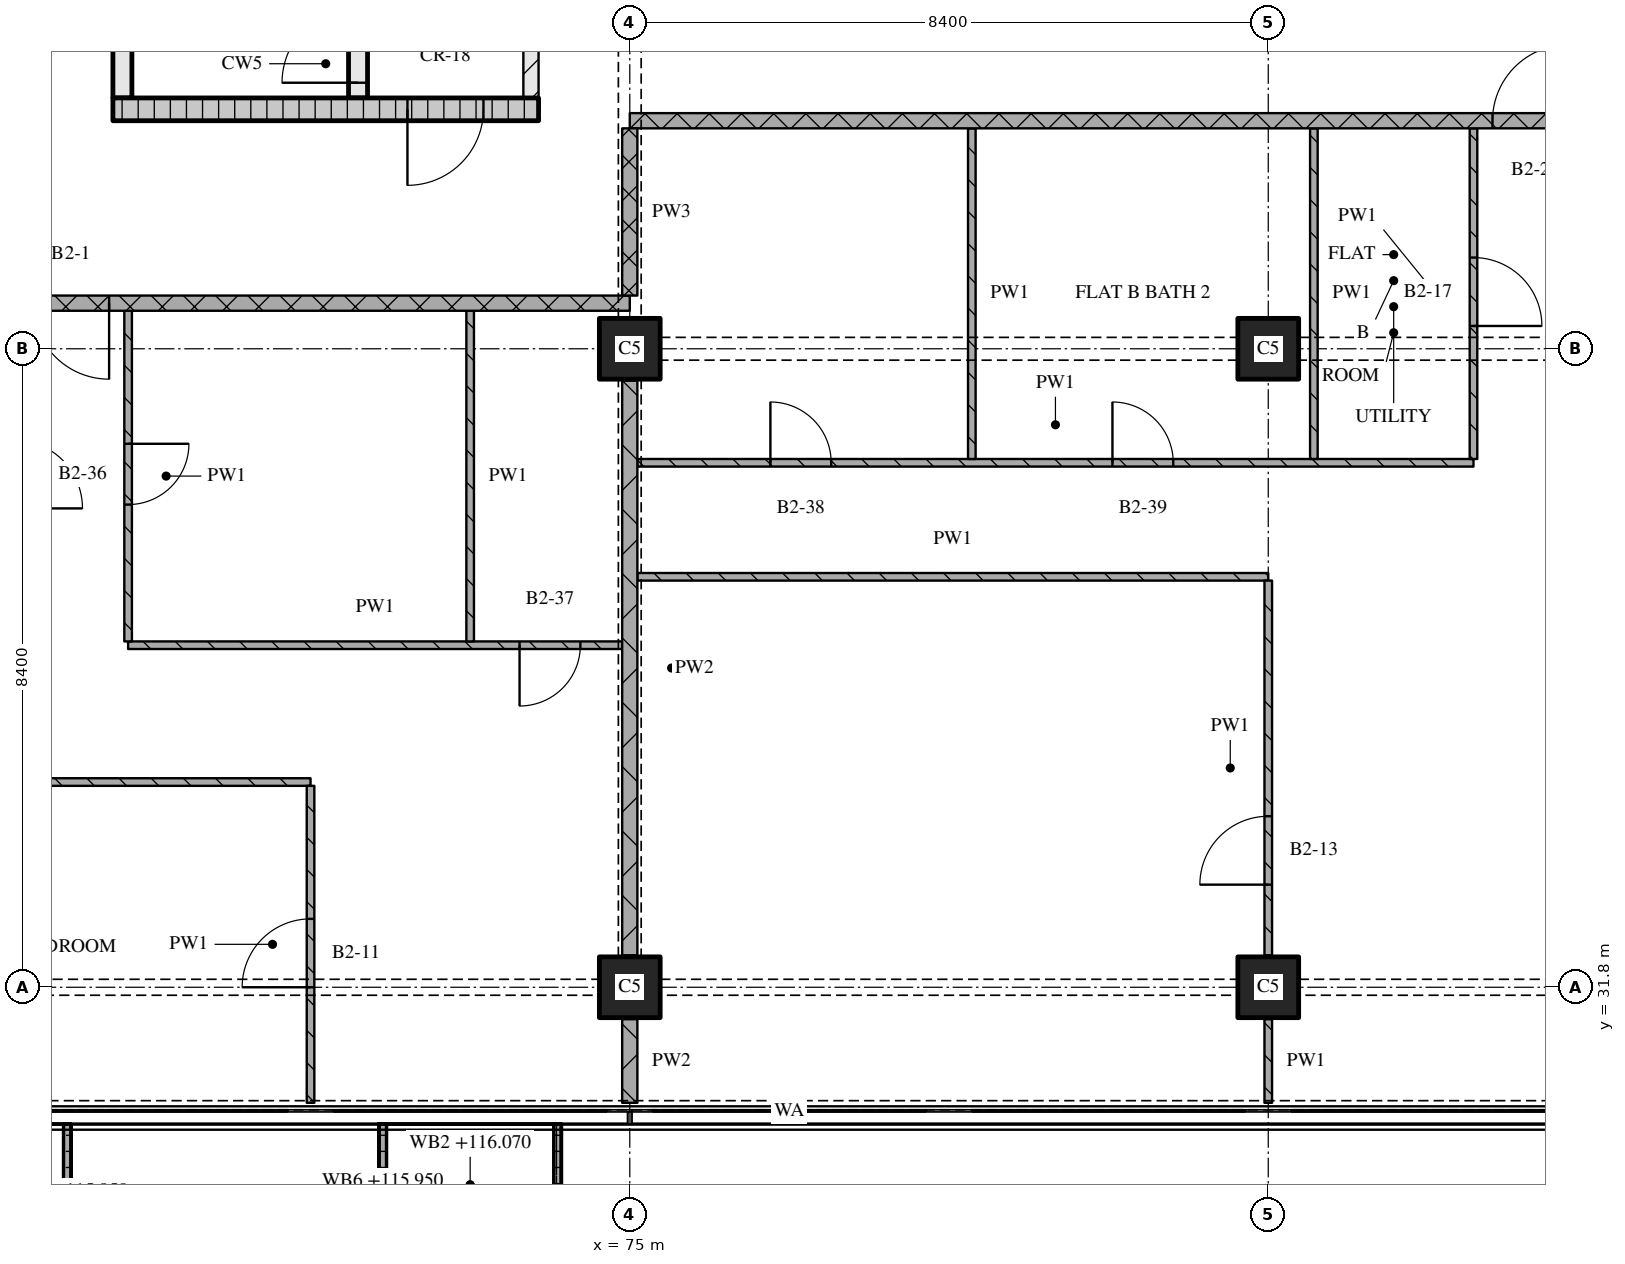
"""IFC4 building model, lengths in metres.
Left out: names, types, materials, properties, quantities, classifications, styles, units other than length and angle.
Written with IfcOpenShell. Run it as: python <this file> out.ifc"""

import sys

from ifc_helpers import new_model, si_unit, direction, frame, frame_2d, origin, origin_2d, place, context, subcontext, project, spatial, polyline, rectangle, outline, extrude, element, fill, save


model = new_model("IFC4")
c1 = context("Model", 3, precision=1e-05, world=origin(), true_north=direction((0.0, 1.0)))
c2 = subcontext(c1, "Body", "Model", "MODEL_VIEW")
j1 = project(units=[si_unit("LENGTHUNIT", "METRE"), si_unit("PLANEANGLEUNIT", "RADIAN")], contexts=[c1])
p1 = place(None, origin())
s1 = spatial("IfcSite", under=j1, at=p1, CompositionType="ELEMENT")
p2 = place(p1, origin())
s2 = spatial("IfcBuilding", under=s1, at=p2, CompositionType="ELEMENT")
p3 = place(p2, frame((0.0, 0.0, 113.25)))
s3 = spatial("IfcBuildingStorey", under=s2, at=p3, CompositionType="ELEMENT", Elevation=113.25)
for number, where, z_axis, x_axis in (
    (1, (75.0, 31.8, 0.0), (0.0, 0.0, 1.0), (1.0, 0.0, 0.0)),
    (2, (75.0, 40.2, 0.0), (0.0, 0.0, 1.0), (1.0, 0.0, 0.0)),
    (3, (83.4, 31.8, 0.0), (0.0, 0.0, 1.0), (1.0, 0.0, 0.0)),
    (4, (83.4, 40.2, 0.0), (0.0, 0.0, 1.0), (1.0, 0.0, 0.0)),
):
    element("IfcColumn", number, at=place(p3, frame(where, z_axis=z_axis, x_axis=x_axis)), inside=s3, PredefinedType="COLUMN", context=c2, shape_type="SweptSolid", body=[
        extrude(rectangle(XDim=0.8, YDim=0.8, at=origin_2d()), origin(), (0.0, 0.0, 1.0), 3.6),
    ])
p4 = place(p3, origin())
e5 = element("IfcWall", 5, at=p4, inside=s3, PredefinedType="SOLIDWALL", context=c2, shape_type="SweptSolid", body=[
    extrude(outline(polyline([(61.35, 30.0), (61.45, 30.0), (61.45, 28.233), (67.55, 28.233), (67.55, 30.0), (67.65, 30.0), (67.65, 28.133), (61.35, 28.133), (61.35, 30.0)])), origin(), (0.0, 0.0, 1.0), 1.0),
])
p5 = place(p3, origin())
e6 = element("IfcWall", 6, at=p5, inside=s3, PredefinedType="SOLIDWALL", context=c2, shape_type="SweptSolid", body=[
    extrude(outline(polyline([(71.7, 30.0), (71.8, 30.0), (71.8, 28.5), (74.0, 28.5), (74.0, 30.0), (74.1, 30.0), (74.1, 28.4), (71.7, 28.4), (71.7, 30.0)])), origin(), (0.0, 0.0, 1.0), 1.0),
])
p6 = place(p3, frame((68.2, 43.35, 0.0), z_axis=(0.0, 0.0, 1.0), x_axis=(1.0, 0.0, 0.0)))
e7 = element("IfcWall", 7, at=p6, inside=s3, PredefinedType="SOLIDWALL", context=c2, shape_type="SweptSolid", body=[
    extrude(rectangle(XDim=5.6, YDim=0.3, at=frame_2d((2.8, 0.0))), origin(), (0.0, 0.0, 1.0), 3.32),
])
p7 = place(p6, frame((3.875, 0.0, 0.0)))
e8 = element("IfcOpeningElement", 8, at=p7, cuts=e7, PredefinedType="OPENING", context=c2, shape_type="SweptSolid", body=[
    extrude(rectangle(XDim=1.0, YDim=2.1, at=frame_2d((0.5, 1.05))), frame((0.0, 0.16, 0.0), z_axis=(0.0, -1.0, 0.0), x_axis=(1.0, 0.0, 0.0)), (0.0, 0.0, 1.0), 0.32),
])
p8 = place(p3, frame((68.325, 43.5, 0.0), z_axis=(0.0, 0.0, 1.0), x_axis=(0.0, 1.0, 0.0)))
e9 = element("IfcWall", 9, at=p8, inside=s3, PredefinedType="SOLIDWALL", context=c2, shape_type="SweptSolid", body=[
    extrude(rectangle(XDim=6.9, YDim=0.25, at=frame_2d((3.45, 0.0))), origin(), (0.0, 0.0, 1.0), 3.32),
])
p9 = place(p3, frame((71.425, 43.5, 0.0), z_axis=(0.0, 0.0, 1.0), x_axis=(0.0, 1.0, 0.0)))
e10 = element("IfcWall", 10, at=p9, inside=s3, PredefinedType="SOLIDWALL", context=c2, shape_type="SweptSolid", body=[
    extrude(rectangle(XDim=6.9, YDim=0.25, at=frame_2d((3.45, 0.0))), origin(), (0.0, 0.0, 1.0), 3.32),
])
p10 = place(p9, frame((0.2, 0.0, 0.0)))
e11 = element("IfcOpeningElement", 11, at=p10, cuts=e10, PredefinedType="OPENING", context=c2, shape_type="SweptSolid", body=[
    extrude(rectangle(XDim=1.0, YDim=2.1, at=frame_2d((0.5, 1.05))), frame((0.0, 0.135, 0.0), z_axis=(0.0, -1.0, 0.0), x_axis=(1.0, 0.0, 0.0)), (0.0, 0.0, 1.0), 0.27),
])
p11 = place(p3, frame((73.7, 43.5, 0.0), z_axis=(0.0, 0.0, 1.0), x_axis=(0.0, 1.0, 0.0)))
e12 = element("IfcWall", 12, at=p11, inside=s3, PredefinedType="PARTITIONING", context=c2, shape_type="SweptSolid", body=[
    extrude(rectangle(XDim=6.9, YDim=0.2, at=frame_2d((3.45, 0.0))), origin(), (0.0, 0.0, 1.0), 3.32),
])
p12 = place(p11, frame((1.0, 0.0, 0.0)))
e13 = element("IfcOpeningElement", 13, at=p12, cuts=e12, PredefinedType="OPENING", context=c2, shape_type="SweptSolid", body=[
    extrude(rectangle(XDim=1.0, YDim=2.1, at=frame_2d((0.5, 1.05))), frame((0.0, 0.11, 0.0), z_axis=(0.0, -1.0, 0.0), x_axis=(1.0, 0.0, 0.0)), (0.0, 0.0, 1.0), 0.22),
])
p13 = place(p3, frame((70.8, 34.5, 0.0), z_axis=(0.0, 0.0, 1.0), x_axis=(-1.0, 0.0, 0.0)))
e14 = element("IfcWall", 14, at=p13, inside=s3, PredefinedType="PARTITIONING", context=c2, shape_type="SweptSolid", body=[
    extrude(rectangle(XDim=22.52, YDim=0.1, at=frame_2d((11.26, 0.0))), origin(), (0.0, 0.0, 1.0), 3.32),
])
p14 = place(p13, frame((10.05, 0.0, 0.0)))
e15 = element("IfcOpeningElement", 15, at=p14, cuts=e14, PredefinedType="OPENING", context=c2, shape_type="SweptSolid", body=[
    extrude(rectangle(XDim=0.9, YDim=2.1, at=frame_2d((0.45, 1.05))), frame((0.0, 0.06, 0.0), z_axis=(0.0, -1.0, 0.0), x_axis=(1.0, 0.0, 0.0)), (0.0, 0.0, 1.0), 0.12),
])
p15 = place(p13, frame((14.25, 0.0, 0.0)))
e16 = element("IfcOpeningElement", 16, at=p15, cuts=e14, PredefinedType="OPENING", context=c2, shape_type="SweptSolid", body=[
    extrude(rectangle(XDim=0.9, YDim=2.1, at=frame_2d((0.45, 1.05))), frame((0.0, 0.06, 0.0), z_axis=(0.0, -1.0, 0.0), x_axis=(1.0, 0.0, 0.0)), (0.0, 0.0, 1.0), 0.12),
])
p16 = place(p13, frame((17.654, 0.0, 0.0)))
e17 = element("IfcOpeningElement", 17, at=p16, cuts=e14, PredefinedType="OPENING", context=c2, shape_type="SweptSolid", body=[
    extrude(rectangle(XDim=0.9, YDim=2.1, at=frame_2d((0.45, 1.05))), frame((0.0, 0.06, 0.0), z_axis=(0.0, -1.0, 0.0), x_axis=(1.0, 0.0, 0.0)), (0.0, 0.0, 1.0), 0.12),
])
p17 = place(p3, frame((68.4, 36.3, 0.0), z_axis=(0.0, 0.0, 1.0), x_axis=(1.0, 0.0, 0.0)))
e18 = element("IfcWall", 18, at=p17, inside=s3, PredefinedType="PARTITIONING", context=c2, shape_type="SweptSolid", body=[
    extrude(rectangle(XDim=6.5, YDim=0.1, at=frame_2d((3.25, 0.0))), origin(), (0.0, 0.0, 1.0), 3.32),
])
p18 = place(p17, frame((5.15, 0.0, 0.0)))
e19 = element("IfcOpeningElement", 19, at=p18, cuts=e18, PredefinedType="OPENING", context=c2, shape_type="SweptSolid", body=[
    extrude(rectangle(XDim=0.8, YDim=2.1, at=frame_2d((0.4, 1.05))), frame((0.0, 0.06, 0.0), z_axis=(0.0, -1.0, 0.0), x_axis=(1.0, 0.0, 0.0)), (0.0, 0.0, 1.0), 0.12),
])
p19 = place(p3, frame((75.1, 37.2, 0.0), z_axis=(0.0, 0.0, 1.0), x_axis=(1.0, 0.0, 0.0)))
e20 = element("IfcWall", 20, at=p19, inside=s3, PredefinedType="PARTITIONING", context=c2, shape_type="SweptSolid", body=[
    extrude(rectangle(XDim=8.3, YDim=0.1, at=frame_2d((4.15, 0.0))), origin(), (0.0, 0.0, 1.0), 3.32),
])
p20 = place(p3, frame((75.1, 38.7, 0.0), z_axis=(0.0, 0.0, 1.0), x_axis=(1.0, 0.0, 0.0)))
e21 = element("IfcWall", 21, at=p20, inside=s3, PredefinedType="PARTITIONING", context=c2, shape_type="SweptSolid", body=[
    extrude(rectangle(XDim=11.0, YDim=0.1, at=frame_2d((5.5, 0.0))), origin(), (0.0, 0.0, 1.0), 3.32),
])
p21 = place(p20, frame((1.75, 0.0, 0.0)))
e22 = element("IfcOpeningElement", 22, at=p21, cuts=e21, PredefinedType="OPENING", context=c2, shape_type="SweptSolid", body=[
    extrude(rectangle(XDim=0.8, YDim=2.1, at=frame_2d((0.4, 1.05))), frame((0.0, 0.06, 0.0), z_axis=(0.0, -1.0, 0.0), x_axis=(1.0, 0.0, 0.0)), (0.0, 0.0, 1.0), 0.12),
])
p22 = place(p20, frame((6.25, 0.0, 0.0)))
e23 = element("IfcOpeningElement", 23, at=p22, cuts=e21, PredefinedType="OPENING", context=c2, shape_type="SweptSolid", body=[
    extrude(rectangle(XDim=0.8, YDim=2.1, at=frame_2d((0.4, 1.05))), frame((0.0, 0.06, 0.0), z_axis=(0.0, -1.0, 0.0), x_axis=(1.0, 0.0, 0.0)), (0.0, 0.0, 1.0), 0.12),
])
p23 = place(p3, frame((75.0, 40.8, 0.0), z_axis=(0.0, 0.0, 1.0), x_axis=(-1.0, 0.0, 0.0)))
e24 = element("IfcWall", 24, at=p23, inside=s3, PredefinedType="PARTITIONING", context=c2, shape_type="SweptSolid", body=[
    extrude(rectangle(XDim=24.18, YDim=0.2, at=frame_2d((12.09, 0.0))), origin(), (0.0, 0.0, 1.0), 3.32),
])
p24 = place(p23, frame((6.85, 0.0, 0.0)))
e25 = element("IfcOpeningElement", 25, at=p24, cuts=e24, PredefinedType="OPENING", context=c2, shape_type="SweptSolid", body=[
    extrude(rectangle(XDim=1.0, YDim=2.1, at=frame_2d((0.5, 1.05))), frame((0.0, 0.11, 0.0), z_axis=(0.0, -1.0, 0.0), x_axis=(1.0, 0.0, 0.0)), (0.0, 0.0, 1.0), 0.22),
])
p25 = place(p3, frame((100.2, 43.2, 0.0), z_axis=(0.0, 0.0, 1.0), x_axis=(-1.0, 0.0, 0.0)))
e26 = element("IfcWall", 26, at=p25, inside=s3, PredefinedType="PARTITIONING", context=c2, shape_type="SweptSolid", body=[
    extrude(rectangle(XDim=25.2, YDim=0.2, at=frame_2d((12.6, 0.0))), origin(), (0.0, 0.0, 1.0), 3.32),
])
p26 = place(p25, frame((12.85, 0.0, 0.0)))
e27 = element("IfcOpeningElement", 27, at=p26, cuts=e26, PredefinedType="OPENING", context=c2, shape_type="SweptSolid", body=[
    extrude(rectangle(XDim=1.0, YDim=2.1, at=frame_2d((0.5, 1.05))), frame((0.0, 0.11, 0.0), z_axis=(0.0, -1.0, 0.0), x_axis=(1.0, 0.0, 0.0)), (0.0, 0.0, 1.0), 0.22),
])
p27 = place(p3, frame((68.4, 40.7, 0.0), z_axis=(0.0, 0.0, 1.0), x_axis=(0.0, -1.0, 0.0)))
e28 = element("IfcWall", 28, at=p27, inside=s3, PredefinedType="PARTITIONING", context=c2, shape_type="SweptSolid", body=[
    extrude(rectangle(XDim=4.35, YDim=0.1, at=frame_2d((2.175, 0.0))), origin(), (0.0, 0.0, 1.0), 3.32),
])
p28 = place(p27, frame((1.75, 0.0, 0.0)))
e29 = element("IfcOpeningElement", 29, at=p28, cuts=e28, PredefinedType="OPENING", context=c2, shape_type="SweptSolid", body=[
    extrude(rectangle(XDim=0.8, YDim=2.1, at=frame_2d((0.4, 1.05))), frame((0.0, 0.06, 0.0), z_axis=(0.0, -1.0, 0.0), x_axis=(1.0, 0.0, 0.0)), (0.0, 0.0, 1.0), 0.12),
])
p29 = place(p3, frame((70.8, 30.28, 0.0), z_axis=(0.0, 0.0, 1.0), x_axis=(0.0, 1.0, 0.0)))
e30 = element("IfcWall", 30, at=p29, inside=s3, PredefinedType="PARTITIONING", context=c2, shape_type="SweptSolid", body=[
    extrude(rectangle(XDim=4.17, YDim=0.1, at=frame_2d((2.085, 0.0))), origin(), (0.0, 0.0, 1.0), 3.32),
])
p30 = place(p29, frame((1.52, 0.0, 0.0)))
e31 = element("IfcOpeningElement", 31, at=p30, cuts=e30, PredefinedType="OPENING", context=c2, shape_type="SweptSolid", body=[
    extrude(rectangle(XDim=0.9, YDim=2.1, at=frame_2d((0.45, 1.05))), frame((0.0, 0.06, 0.0), z_axis=(0.0, -1.0, 0.0), x_axis=(1.0, 0.0, 0.0)), (0.0, 0.0, 1.0), 0.12),
])
p31 = place(p3, frame((72.9, 40.7, 0.0), z_axis=(0.0, 0.0, 1.0), x_axis=(0.0, -1.0, 0.0)))
e32 = element("IfcWall", 32, at=p31, inside=s3, PredefinedType="PARTITIONING", context=c2, shape_type="SweptSolid", body=[
    extrude(rectangle(XDim=4.35, YDim=0.1, at=frame_2d((2.175, 0.0))), origin(), (0.0, 0.0, 1.0), 3.32),
])
p32 = place(p3, frame((75.0, 43.1, 0.0), z_axis=(0.0, 0.0, 1.0), x_axis=(0.0, -1.0, 0.0)))
e33 = element("IfcWall", 33, at=p32, inside=s3, PredefinedType="PARTITIONING", context=c2, shape_type="SweptSolid", body=[
    extrude(rectangle(XDim=2.2, YDim=0.2, at=frame_2d((1.1, 0.0))), origin(), (0.0, 0.0, 1.0), 2.43),
])
p33 = place(p3, frame((75.0, 31.38, 0.0), z_axis=(0.0, 0.0, 1.0), x_axis=(0.0, -1.0, 0.0)))
e34 = element("IfcWall", 34, at=p33, inside=s3, PredefinedType="PARTITIONING", context=c2, shape_type="SweptSolid", body=[
    extrude(rectangle(XDim=1.1, YDim=0.2, at=frame_2d((0.55, 0.0))), origin(), (0.0, 0.0, 1.0), 3.32),
])
p34 = place(p3, frame((75.0, 39.78, 0.0), z_axis=(0.0, 0.0, 1.0), x_axis=(0.0, -1.0, 0.0)))
e35 = element("IfcWall", 35, at=p34, inside=s3, PredefinedType="PARTITIONING", context=c2, shape_type="SweptSolid", body=[
    extrude(rectangle(XDim=7.56, YDim=0.2, at=frame_2d((3.78, 0.0))), origin(), (0.0, 0.0, 1.0), 2.83),
])
p35 = place(p3, frame((79.5, 43.1, 0.0), z_axis=(0.0, 0.0, 1.0), x_axis=(0.0, -1.0, 0.0)))
e36 = element("IfcWall", 36, at=p35, inside=s3, PredefinedType="PARTITIONING", context=c2, shape_type="SweptSolid", body=[
    extrude(rectangle(XDim=4.35, YDim=0.1, at=frame_2d((2.175, 0.0))), origin(), (0.0, 0.0, 1.0), 3.32),
])
p36 = place(p3, frame((83.4, 31.38, 0.0), z_axis=(0.0, 0.0, 1.0), x_axis=(0.0, -1.0, 0.0)))
e37 = element("IfcWall", 37, at=p36, inside=s3, PredefinedType="PARTITIONING", context=c2, shape_type="SweptSolid", body=[
    extrude(rectangle(XDim=1.1, YDim=0.1, at=frame_2d((0.55, 0.0))), origin(), (0.0, 0.0, 1.0), 3.32),
])
p37 = place(p3, frame((83.4, 32.22, 0.0), z_axis=(0.0, 0.0, 1.0), x_axis=(0.0, 1.0, 0.0)))
e38 = element("IfcWall", 38, at=p37, inside=s3, PredefinedType="PARTITIONING", context=c2, shape_type="SweptSolid", body=[
    extrude(rectangle(XDim=4.93, YDim=0.1, at=frame_2d((2.465, 0.0))), origin(), (0.0, 0.0, 1.0), 3.32),
])
p38 = place(p37, frame((0.93, 0.0, 0.0)))
e39 = element("IfcOpeningElement", 39, at=p38, cuts=e38, PredefinedType="OPENING", context=c2, shape_type="SweptSolid", body=[
    extrude(rectangle(XDim=0.9, YDim=2.1, at=frame_2d((0.45, 1.05))), frame((0.0, 0.06, 0.0), z_axis=(0.0, -1.0, 0.0), x_axis=(1.0, 0.0, 0.0)), (0.0, 0.0, 1.0), 0.12),
])
p39 = place(p3, frame((84.0, 43.1, 0.0), z_axis=(0.0, 0.0, 1.0), x_axis=(0.0, -1.0, 0.0)))
e40 = element("IfcWall", 40, at=p39, inside=s3, PredefinedType="PARTITIONING", context=c2, shape_type="SweptSolid", body=[
    extrude(rectangle(XDim=4.35, YDim=0.1, at=frame_2d((2.175, 0.0))), origin(), (0.0, 0.0, 1.0), 3.32),
])
p40 = place(p3, frame((86.1, 38.75, 0.0), z_axis=(0.0, 0.0, 1.0), x_axis=(0.0, 1.0, 0.0)))
e41 = element("IfcWall", 41, at=p40, inside=s3, PredefinedType="PARTITIONING", context=c2, shape_type="SweptSolid", body=[
    extrude(rectangle(XDim=4.35, YDim=0.1, at=frame_2d((2.175, 0.0))), origin(), (0.0, 0.0, 1.0), 3.32),
])
p41 = place(p40, frame((1.75, 0.0, 0.0)))
e42 = element("IfcOpeningElement", 42, at=p41, cuts=e41, PredefinedType="OPENING", context=c2, shape_type="SweptSolid", body=[
    extrude(rectangle(XDim=0.9, YDim=2.1, at=frame_2d((0.45, 1.05))), frame((0.0, 0.06, 0.0), z_axis=(0.0, -1.0, 0.0), x_axis=(1.0, 0.0, 0.0)), (0.0, 0.0, 1.0), 0.12),
])
p42 = place(p7, origin())
e43 = element("IfcDoor", 43, at=p42, inside=s3, OperationType="SINGLE_SWING_RIGHT", PredefinedType="DOOR", context=c2, shape_type="SweptSolid", body=[
    extrude(rectangle(XDim=1.0, YDim=2.1, at=frame_2d((0.5, 1.05))), frame((0.0, 0.025, 0.0), z_axis=(0.0, -1.0, 0.0), x_axis=(1.0, 0.0, 0.0)), (0.0, 0.0, 1.0), 0.05),
])
fill(e8, e43)
p43 = place(p10, origin())
e44 = element("IfcDoor", 44, at=p43, inside=s3, OperationType="SINGLE_SWING_LEFT", PredefinedType="DOOR", context=c2, shape_type="SweptSolid", body=[
    extrude(rectangle(XDim=1.0, YDim=2.1, at=frame_2d((0.5, 1.05))), frame((0.0, 0.025, 0.0), z_axis=(0.0, -1.0, 0.0), x_axis=(1.0, 0.0, 0.0)), (0.0, 0.0, 1.0), 0.05),
])
fill(e11, e44)
p44 = place(p18, origin())
e45 = element("IfcDoor", 45, at=p44, inside=s3, OperationType="SINGLE_SWING_RIGHT", PredefinedType="DOOR", context=c2, shape_type="SweptSolid", body=[
    extrude(rectangle(XDim=0.8, YDim=2.1, at=frame_2d((0.4, 1.05))), frame((0.0, 0.025, 0.0), z_axis=(0.0, -1.0, 0.0), x_axis=(1.0, 0.0, 0.0)), (0.0, 0.0, 1.0), 0.05),
])
fill(e19, e45)
p45 = place(p21, origin())
e46 = element("IfcDoor", 46, at=p45, inside=s3, OperationType="SINGLE_SWING_LEFT", PredefinedType="DOOR", context=c2, shape_type="SweptSolid", body=[
    extrude(rectangle(XDim=0.8, YDim=2.1, at=frame_2d((0.4, 1.05))), frame((0.0, 0.025, 0.0), z_axis=(0.0, -1.0, 0.0), x_axis=(1.0, 0.0, 0.0)), (0.0, 0.0, 1.0), 0.05),
])
fill(e22, e46)
p46 = place(p22, origin())
e47 = element("IfcDoor", 47, at=p46, inside=s3, OperationType="SINGLE_SWING_LEFT", PredefinedType="DOOR", context=c2, shape_type="SweptSolid", body=[
    extrude(rectangle(XDim=0.8, YDim=2.1, at=frame_2d((0.4, 1.05))), frame((0.0, 0.025, 0.0), z_axis=(0.0, -1.0, 0.0), x_axis=(1.0, 0.0, 0.0)), (0.0, 0.0, 1.0), 0.05),
])
fill(e23, e47)
p47 = place(p24, origin())
e48 = element("IfcDoor", 48, at=p47, inside=s3, OperationType="SINGLE_SWING_LEFT", PredefinedType="DOOR", context=c2, shape_type="SweptSolid", body=[
    extrude(rectangle(XDim=1.0, YDim=2.1, at=frame_2d((0.5, 1.05))), frame((0.0, 0.025, 0.0), z_axis=(0.0, -1.0, 0.0), x_axis=(1.0, 0.0, 0.0)), (0.0, 0.0, 1.0), 0.05),
])
fill(e25, e48)
p48 = place(p26, origin())
e49 = element("IfcDoor", 49, at=p48, inside=s3, OperationType="SINGLE_SWING_RIGHT", PredefinedType="DOOR", context=c2, shape_type="SweptSolid", body=[
    extrude(rectangle(XDim=1.0, YDim=2.1, at=frame_2d((0.5, 1.05))), frame((0.0, 0.025, 0.0), z_axis=(0.0, -1.0, 0.0), x_axis=(1.0, 0.0, 0.0)), (0.0, 0.0, 1.0), 0.05),
])
fill(e27, e49)
p49 = place(p28, origin())
e50 = element("IfcDoor", 50, at=p49, inside=s3, OperationType="SINGLE_SWING_LEFT", PredefinedType="DOOR", context=c2, shape_type="SweptSolid", body=[
    extrude(rectangle(XDim=0.8, YDim=2.1, at=frame_2d((0.4, 1.05))), frame((0.0, 0.025, 0.0), z_axis=(0.0, -1.0, 0.0), x_axis=(1.0, 0.0, 0.0)), (0.0, 0.0, 1.0), 0.05),
])
fill(e29, e50)
p50 = place(p30, origin())
e51 = element("IfcDoor", 51, at=p50, inside=s3, OperationType="SINGLE_SWING_LEFT", PredefinedType="DOOR", context=c2, shape_type="SweptSolid", body=[
    extrude(rectangle(XDim=0.9, YDim=2.1, at=frame_2d((0.45, 1.05))), frame((0.0, 0.025, 0.0), z_axis=(0.0, -1.0, 0.0), x_axis=(1.0, 0.0, 0.0)), (0.0, 0.0, 1.0), 0.05),
])
fill(e31, e51)
p51 = place(p38, origin())
e52 = element("IfcDoor", 52, at=p51, inside=s3, OperationType="SINGLE_SWING_LEFT", PredefinedType="DOOR", context=c2, shape_type="SweptSolid", body=[
    extrude(rectangle(XDim=0.9, YDim=2.1, at=frame_2d((0.45, 1.05))), frame((0.0, 0.025, 0.0), z_axis=(0.0, -1.0, 0.0), x_axis=(1.0, 0.0, 0.0)), (0.0, 0.0, 1.0), 0.05),
])
fill(e39, e52)
p52 = place(p41, origin())
e53 = element("IfcDoor", 53, at=p52, inside=s3, OperationType="SINGLE_SWING_RIGHT", PredefinedType="DOOR", context=c2, shape_type="SweptSolid", body=[
    extrude(rectangle(XDim=0.9, YDim=2.1, at=frame_2d((0.45, 1.05))), frame((0.0, 0.025, 0.0), z_axis=(0.0, -1.0, 0.0), x_axis=(1.0, 0.0, 0.0)), (0.0, 0.0, 1.0), 0.05),
])
fill(e42, e53)
save(model, sys.argv[1])
